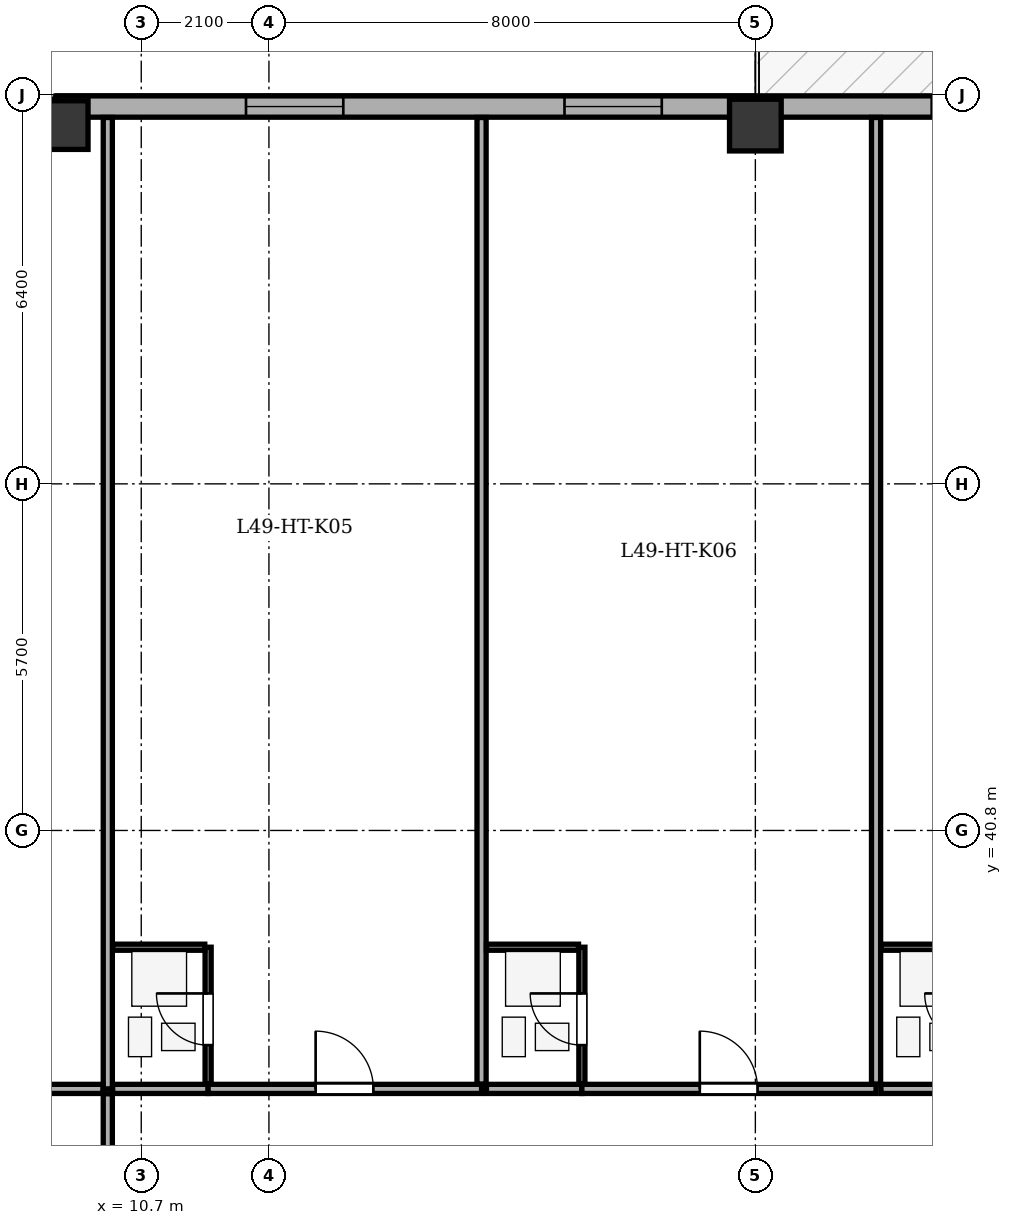
"""IFC4 building model, lengths in metres.
Left out: names, types, materials, properties, quantities, classifications, styles, units other than length and angle.
Written with IfcOpenShell. Run it as: python <this file> out.ifc"""

import sys

from ifc_helpers import new_model, si_unit, direction, frame, frame_2d, origin, origin_2d, place, context, subcontext, project, spatial, rectangle, extrude, element, fill, save


model = new_model("IFC4")
c1 = context("Model", 3, precision=1e-05, world=origin(), true_north=direction((0.0, 1.0)))
c2 = subcontext(c1, "Body", "Model", "MODEL_VIEW")
j1 = project(units=[si_unit("LENGTHUNIT", "METRE"), si_unit("PLANEANGLEUNIT", "RADIAN")], contexts=[c1])
p1 = place(None, origin())
s1 = spatial("IfcSite", under=j1, at=p1, CompositionType="ELEMENT")
p2 = place(p1, origin())
s2 = spatial("IfcBuilding", under=s1, at=p2, CompositionType="ELEMENT")
p3 = place(p2, frame((0.0, 0.0, 190.3)))
s3 = spatial("IfcBuildingStorey", under=s2, at=p3, CompositionType="ELEMENT", Elevation=190.3)
p4 = place(p3, frame((9.3, 52.4, 0.0), z_axis=(0.0, 0.0, 1.0), x_axis=(1.0, 0.0, 0.0)))
e1 = element("IfcColumn", 1, at=p4, inside=s3, PredefinedType="COLUMN", context=c2, shape_type="SweptSolid", body=[
    extrude(rectangle(XDim=0.8, YDim=1.05, at=origin_2d()), origin(), (0.0, 0.0, 1.0), 3.5),
])
p5 = place(p3, frame((20.8, 52.4, 0.0), z_axis=(0.0, 0.0, 1.0), x_axis=(1.0, 0.0, 0.0)))
e2 = element("IfcColumn", 2, at=p5, inside=s3, PredefinedType="COLUMN", context=c2, shape_type="SweptSolid", body=[
    extrude(rectangle(XDim=0.85, YDim=0.85, at=origin_2d()), origin(), (0.0, 0.0, 1.0), 3.5),
])
p6 = place(p3, frame((4.495, 47.9, 0.0), z_axis=(0.0, 0.0, 1.0), x_axis=(0.707088817216, 0.7071247447, 0.0)))
e3 = element("IfcWall", 3, at=p6, inside=s3, PredefinedType="STANDARD", context=c2, shape_type="SweptSolid", body=[
    extrude(rectangle(XDim=6.795, YDim=0.35, at=frame_2d((3.398, 0.0))), origin(), (0.0, 0.0, 1.0), 2.785),
])
p7 = place(p6, frame((2.698, 0.0, 0.75)))
e4 = element("IfcOpeningElement", 4, at=p7, cuts=e3, PredefinedType="OPENING", context=c2, shape_type="SweptSolid", body=[
    extrude(rectangle(XDim=1.4, YDim=1.65, at=frame_2d((0.7, 0.825))), frame((0.0, 0.185, 0.0), z_axis=(0.0, -1.0, 0.0), x_axis=(1.0, 0.0, 0.0)), (0.0, 0.0, 1.0), 0.37),
])
p8 = place(p3, frame((9.3, 52.705, 0.0), z_axis=(0.0, 0.0, 1.0), x_axis=(1.0, 0.0, 0.0)))
e5 = element("IfcWall", 5, at=p8, inside=s3, PredefinedType="STANDARD", context=c2, shape_type="SweptSolid", body=[
    extrude(rectangle(XDim=35.0, YDim=0.35, at=frame_2d((17.5, 0.0))), origin(), (0.0, 0.0, 1.0), 2.785),
])
p9 = place(p8, frame((14.4, 0.0, 0.0)))
e6 = element("IfcOpeningElement", 6, at=p9, cuts=e5, PredefinedType="OPENING", context=c2, shape_type="SweptSolid", body=[
    extrude(rectangle(XDim=1.0, YDim=2.02, at=frame_2d((0.5, 1.01))), frame((0.0, 0.185, 0.0), z_axis=(0.0, -1.0, 0.0), x_axis=(1.0, 0.0, 0.0)), (0.0, 0.0, 1.0), 0.37),
])
p10 = place(p8, frame((3.123, 0.0, 0.75)))
e7 = element("IfcOpeningElement", 7, at=p10, cuts=e5, PredefinedType="OPENING", context=c2, shape_type="SweptSolid", body=[
    extrude(rectangle(XDim=1.6, YDim=1.75, at=frame_2d((0.8, 0.875))), frame((0.0, 0.185, 0.0), z_axis=(0.0, -1.0, 0.0), x_axis=(1.0, 0.0, 0.0)), (0.0, 0.0, 1.0), 0.37),
])
p11 = place(p8, frame((8.361, 0.0, 0.75)))
e8 = element("IfcOpeningElement", 8, at=p11, cuts=e5, PredefinedType="OPENING", context=c2, shape_type="SweptSolid", body=[
    extrude(rectangle(XDim=1.6, YDim=1.75, at=frame_2d((0.8, 0.875))), frame((0.0, 0.185, 0.0), z_axis=(0.0, -1.0, 0.0), x_axis=(1.0, 0.0, 0.0)), (0.0, 0.0, 1.0), 0.37),
])
p12 = place(p8, frame((22.22, 0.0, 0.75)))
e9 = element("IfcOpeningElement", 9, at=p12, cuts=e5, PredefinedType="OPENING", context=c2, shape_type="SweptSolid", body=[
    extrude(rectangle(XDim=1.6, YDim=1.75, at=frame_2d((0.8, 0.875))), frame((0.0, 0.185, 0.0), z_axis=(0.0, -1.0, 0.0), x_axis=(1.0, 0.0, 0.0)), (0.0, 0.0, 1.0), 0.37),
])
p13 = place(p8, frame((28.809, 0.0, 0.75)))
e10 = element("IfcOpeningElement", 10, at=p13, cuts=e5, PredefinedType="OPENING", context=c2, shape_type="SweptSolid", body=[
    extrude(rectangle(XDim=1.6, YDim=1.75, at=frame_2d((0.8, 0.875))), frame((0.0, 0.185, 0.0), z_axis=(0.0, -1.0, 0.0), x_axis=(1.0, 0.0, 0.0)), (0.0, 0.0, 1.0), 0.37),
])
p14 = place(p8, frame((31.803, 0.0, 0.75)))
e11 = element("IfcOpeningElement", 11, at=p14, cuts=e5, PredefinedType="OPENING", context=c2, shape_type="SweptSolid", body=[
    extrude(rectangle(XDim=1.6, YDim=1.75, at=frame_2d((0.8, 0.875))), frame((0.0, 0.185, 0.0), z_axis=(0.0, -1.0, 0.0), x_axis=(1.0, 0.0, 0.0)), (0.0, 0.0, 1.0), 0.37),
])
p15 = place(p3, frame((10.15, 36.55, 0.0), z_axis=(0.0, 0.0, 1.0), x_axis=(0.0, 1.0, 0.0)))
e12 = element("IfcWall", 12, at=p15, inside=s3, PredefinedType="PARTITIONING", context=c2, shape_type="SweptSolid", body=[
    extrude(rectangle(XDim=15.975, YDim=0.15, at=frame_2d((7.987, 0.0))), origin(), (0.0, 0.0, 1.0), 3.2),
])
p16 = place(p3, frame((10.23, 36.55, 0.0), z_axis=(0.0, 0.0, 1.0), x_axis=(1.0, 0.0, 0.0)))
e13 = element("IfcWall", 13, at=p16, inside=s3, PredefinedType="PARTITIONING", context=c2, shape_type="SweptSolid", body=[
    extrude(rectangle(XDim=1.57, YDim=0.15, at=frame_2d((0.785, 0.0))), origin(), (0.0, 0.0, 1.0), 3.2),
])
p17 = place(p3, frame((11.8, 36.55, 0.0), z_axis=(0.0, 0.0, 1.0), x_axis=(1.0, 0.0, 0.0)))
e14 = element("IfcWall", 14, at=p17, inside=s3, PredefinedType="PARTITIONING", context=c2, shape_type="SweptSolid", body=[
    extrude(rectangle(XDim=4.497, YDim=0.15, at=frame_2d((2.249, 0.0))), origin(), (0.0, 0.0, 1.0), 3.2),
])
p18 = place(p17, frame((1.768, 0.0, 0.0)))
e15 = element("IfcOpeningElement", 15, at=p18, cuts=e14, PredefinedType="OPENING", context=c2, shape_type="SweptSolid", body=[
    extrude(rectangle(XDim=0.95, YDim=2.1, at=frame_2d((0.475, 1.05))), frame((0.0, 0.085, 0.0), z_axis=(0.0, -1.0, 0.0), x_axis=(1.0, 0.0, 0.0)), (0.0, 0.0, 1.0), 0.17),
])
p19 = place(p3, frame((11.8, 36.63, 0.0), z_axis=(0.0, 0.0, 1.0), x_axis=(0.0, 1.0, 0.0)))
e16 = element("IfcWall", 16, at=p19, inside=s3, PredefinedType="PARTITIONING", context=c2, shape_type="SweptSolid", body=[
    extrude(rectangle(XDim=2.25, YDim=0.1, at=frame_2d((1.125, 0.0))), origin(), (0.0, 0.0, 1.0), 3.2),
])
p20 = place(p19, frame((0.64, 0.0, 0.0)))
e17 = element("IfcOpeningElement", 17, at=p20, cuts=e16, PredefinedType="OPENING", context=c2, shape_type="SweptSolid", body=[
    extrude(rectangle(XDim=0.85, YDim=2.05, at=frame_2d((0.425, 1.025))), frame((0.0, 0.06, 0.0), z_axis=(0.0, -1.0, 0.0), x_axis=(1.0, 0.0, 0.0)), (0.0, 0.0, 1.0), 0.12),
])
p21 = place(p3, frame((10.23, 38.88, 0.0), z_axis=(0.0, 0.0, 1.0), x_axis=(1.0, 0.0, 0.0)))
e18 = element("IfcWall", 18, at=p21, inside=s3, PredefinedType="PARTITIONING", context=c2, shape_type="SweptSolid", body=[
    extrude(rectangle(XDim=1.515, YDim=0.1, at=frame_2d((0.758, 0.0))), origin(), (0.0, 0.0, 1.0), 3.2),
])
p22 = place(p3, frame((16.297, 36.63, 0.0), z_axis=(0.0, 0.0, 1.0), x_axis=(0.0, 1.0, 0.0)))
e19 = element("IfcWall", 19, at=p22, inside=s3, PredefinedType="PARTITIONING", context=c2, shape_type="SweptSolid", body=[
    extrude(rectangle(XDim=15.895, YDim=0.15, at=frame_2d((7.948, 0.0))), origin(), (0.0, 0.0, 1.0), 3.2),
])
p23 = place(p3, frame((16.377, 36.55, 0.0), z_axis=(0.0, 0.0, 1.0), x_axis=(1.0, 0.0, 0.0)))
e20 = element("IfcWall", 20, at=p23, inside=s3, PredefinedType="PARTITIONING", context=c2, shape_type="SweptSolid", body=[
    extrude(rectangle(XDim=1.57, YDim=0.15, at=frame_2d((0.785, 0.0))), origin(), (0.0, 0.0, 1.0), 3.2),
])
p24 = place(p3, frame((17.947, 36.55, 0.0), z_axis=(0.0, 0.0, 1.0), x_axis=(1.0, 0.0, 0.0)))
e21 = element("IfcWall", 21, at=p24, inside=s3, PredefinedType="PARTITIONING", context=c2, shape_type="SweptSolid", body=[
    extrude(rectangle(XDim=4.838, YDim=0.15, at=frame_2d((2.419, 0.0))), origin(), (0.0, 0.0, 1.0), 3.2),
])
p25 = place(p24, frame((1.939, 0.0, 0.0)))
e22 = element("IfcOpeningElement", 22, at=p25, cuts=e21, PredefinedType="OPENING", context=c2, shape_type="SweptSolid", body=[
    extrude(rectangle(XDim=0.95, YDim=2.1, at=frame_2d((0.475, 1.05))), frame((0.0, 0.085, 0.0), z_axis=(0.0, -1.0, 0.0), x_axis=(1.0, 0.0, 0.0)), (0.0, 0.0, 1.0), 0.17),
])
p26 = place(p3, frame((17.947, 36.63, 0.0), z_axis=(0.0, 0.0, 1.0), x_axis=(0.0, 1.0, 0.0)))
e23 = element("IfcWall", 23, at=p26, inside=s3, PredefinedType="PARTITIONING", context=c2, shape_type="SweptSolid", body=[
    extrude(rectangle(XDim=2.25, YDim=0.1, at=frame_2d((1.125, 0.0))), origin(), (0.0, 0.0, 1.0), 3.2),
])
p27 = place(p26, frame((0.64, 0.0, 0.0)))
e24 = element("IfcOpeningElement", 24, at=p27, cuts=e23, PredefinedType="OPENING", context=c2, shape_type="SweptSolid", body=[
    extrude(rectangle(XDim=0.85, YDim=2.05, at=frame_2d((0.425, 1.025))), frame((0.0, 0.06, 0.0), z_axis=(0.0, -1.0, 0.0), x_axis=(1.0, 0.0, 0.0)), (0.0, 0.0, 1.0), 0.12),
])
p28 = place(p3, frame((16.377, 38.88, 0.0), z_axis=(0.0, 0.0, 1.0), x_axis=(1.0, 0.0, 0.0)))
e25 = element("IfcWall", 25, at=p28, inside=s3, PredefinedType="PARTITIONING", context=c2, shape_type="SweptSolid", body=[
    extrude(rectangle(XDim=1.515, YDim=0.1, at=frame_2d((0.758, 0.0))), origin(), (0.0, 0.0, 1.0), 3.2),
])
p29 = place(p3, frame((22.785, 36.63, 0.0), z_axis=(0.0, 0.0, 1.0), x_axis=(0.0, 1.0, 0.0)))
e26 = element("IfcWall", 26, at=p29, inside=s3, PredefinedType="PARTITIONING", context=c2, shape_type="SweptSolid", body=[
    extrude(rectangle(XDim=15.895, YDim=0.15, at=frame_2d((7.948, 0.0))), origin(), (0.0, 0.0, 1.0), 3.2),
])
p30 = place(p3, frame((22.865, 36.55, 0.0), z_axis=(0.0, 0.0, 1.0), x_axis=(1.0, 0.0, 0.0)))
e27 = element("IfcWall", 27, at=p30, inside=s3, PredefinedType="PARTITIONING", context=c2, shape_type="SweptSolid", body=[
    extrude(rectangle(XDim=1.57, YDim=0.15, at=frame_2d((0.785, 0.0))), origin(), (0.0, 0.0, 1.0), 3.2),
])
p31 = place(p3, frame((22.865, 38.88, 0.0), z_axis=(0.0, 0.0, 1.0), x_axis=(1.0, 0.0, 0.0)))
e28 = element("IfcWall", 28, at=p31, inside=s3, PredefinedType="PARTITIONING", context=c2, shape_type="SweptSolid", body=[
    extrude(rectangle(XDim=1.515, YDim=0.1, at=frame_2d((0.757, 0.0))), origin(), (0.0, 0.0, 1.0), 3.2),
])
p32 = place(p3, frame((4.675, 36.55, 0.0), z_axis=(0.0, 0.0, 1.0), x_axis=(1.0, 0.0, 0.0)))
e29 = element("IfcWall", 29, at=p32, inside=s3, PredefinedType="PARTITIONING", context=c2, shape_type="SweptSolid", body=[
    extrude(rectangle(XDim=5.395, YDim=0.15, at=frame_2d((2.698, 0.0))), origin(), (0.0, 0.0, 1.0), 3.2),
])
p33 = place(p3, frame((10.15, 17.93, 0.0), z_axis=(0.0, 0.0, 1.0), x_axis=(0.0, 1.0, 0.0)))
e30 = element("IfcWall", 30, at=p33, inside=s3, PredefinedType="PARTITIONING", context=c2, shape_type="SweptSolid", body=[
    extrude(rectangle(XDim=18.54, YDim=0.15, at=frame_2d((9.27, 0.0))), origin(), (0.0, 0.0, 1.0), 3.2),
])
p34 = place(p33, frame((8.79, 0.0, 0.0)))
e31 = element("IfcOpeningElement", 31, at=p34, cuts=e30, PredefinedType="OPENING", context=c2, shape_type="SweptSolid", body=[
    extrude(rectangle(XDim=0.95, YDim=2.1, at=frame_2d((0.475, 1.05))), frame((0.0, 0.085, 0.0), z_axis=(0.0, -1.0, 0.0), x_axis=(1.0, 0.0, 0.0)), (0.0, 0.0, 1.0), 0.17),
])
p35 = place(p9, origin())
e32 = element("IfcDoor", 32, at=p35, inside=s3, OperationType="SINGLE_SWING_RIGHT", PredefinedType="DOOR", context=c2, shape_type="SweptSolid", body=[
    extrude(rectangle(XDim=1.0, YDim=2.02, at=frame_2d((0.5, 1.01))), frame((0.0, 0.025, 0.0), z_axis=(0.0, -1.0, 0.0), x_axis=(1.0, 0.0, 0.0)), (0.0, 0.0, 1.0), 0.05),
])
fill(e6, e32)
p36 = place(p10, origin())
e33 = element("IfcWindow", 33, at=p36, inside=s3, PartitioningType="SINGLE_PANEL", PredefinedType="WINDOW", context=c2, shape_type="SweptSolid", body=[
    extrude(rectangle(XDim=1.6, YDim=1.75, at=frame_2d((0.8, 0.875))), frame((0.0, -0.01, 0.0), z_axis=(0.0, -1.0, 0.0), x_axis=(1.0, 0.0, 0.0)), (0.0, 0.0, 1.0), 0.06),
])
fill(e7, e33)
p37 = place(p11, origin())
e34 = element("IfcWindow", 34, at=p37, inside=s3, PartitioningType="SINGLE_PANEL", PredefinedType="WINDOW", context=c2, shape_type="SweptSolid", body=[
    extrude(rectangle(XDim=1.6, YDim=1.75, at=frame_2d((0.8, 0.875))), frame((0.0, -0.01, 0.0), z_axis=(0.0, -1.0, 0.0), x_axis=(1.0, 0.0, 0.0)), (0.0, 0.0, 1.0), 0.06),
])
fill(e8, e34)
p38 = place(p20, origin())
e35 = element("IfcDoor", 35, at=p38, inside=s3, OperationType="SINGLE_SWING_RIGHT", PredefinedType="DOOR", context=c2, shape_type="SweptSolid", body=[
    extrude(rectangle(XDim=0.85, YDim=2.05, at=frame_2d((0.425, 1.025))), frame((0.0, 0.025, 0.0), z_axis=(0.0, -1.0, 0.0), x_axis=(1.0, 0.0, 0.0)), (0.0, 0.0, 1.0), 0.05),
])
fill(e17, e35)
p39 = place(p18, origin())
e36 = element("IfcDoor", 36, at=p39, inside=s3, OperationType="SINGLE_SWING_LEFT", PredefinedType="DOOR", context=c2, shape_type="SweptSolid", body=[
    extrude(rectangle(XDim=0.95, YDim=2.1, at=frame_2d((0.475, 1.05))), frame((0.0, 0.025, 0.0), z_axis=(0.0, -1.0, 0.0), x_axis=(1.0, 0.0, 0.0)), (0.0, 0.0, 1.0), 0.05),
])
fill(e15, e36)
p40 = place(p27, origin())
e37 = element("IfcDoor", 37, at=p40, inside=s3, OperationType="SINGLE_SWING_RIGHT", PredefinedType="DOOR", context=c2, shape_type="SweptSolid", body=[
    extrude(rectangle(XDim=0.85, YDim=2.05, at=frame_2d((0.425, 1.025))), frame((0.0, 0.025, 0.0), z_axis=(0.0, -1.0, 0.0), x_axis=(1.0, 0.0, 0.0)), (0.0, 0.0, 1.0), 0.05),
])
fill(e24, e37)
p41 = place(p25, origin())
e38 = element("IfcDoor", 38, at=p41, inside=s3, OperationType="SINGLE_SWING_LEFT", PredefinedType="DOOR", context=c2, shape_type="SweptSolid", body=[
    extrude(rectangle(XDim=0.95, YDim=2.1, at=frame_2d((0.475, 1.05))), frame((0.0, 0.025, 0.0), z_axis=(0.0, -1.0, 0.0), x_axis=(1.0, 0.0, 0.0)), (0.0, 0.0, 1.0), 0.05),
])
fill(e22, e38)
save(model, sys.argv[1])
